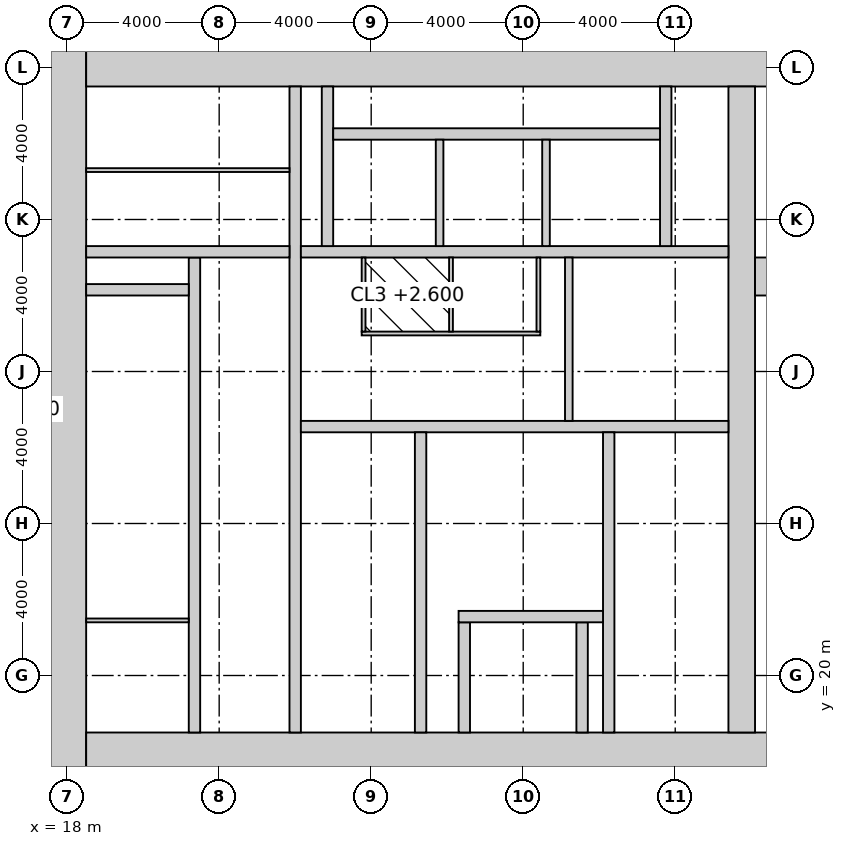
"""IFC4 building model, lengths in metres.
Left out: names, types, materials, properties, quantities, classifications, styles, units other than length and angle.
Written with IfcOpenShell. Run it as: python <this file> out.ifc"""

import sys

from ifc_helpers import new_model, si_unit, direction, frame, frame_2d, origin, place, context, subcontext, project, spatial, rectangle, extrude, element, fill, save


model = new_model("IFC4")
c1 = context("Model", 3, precision=1e-05, world=origin(), true_north=direction((0.0, 1.0)))
c2 = subcontext(c1, "Body", "Model", "MODEL_VIEW")
j1 = project(units=[si_unit("LENGTHUNIT", "METRE"), si_unit("PLANEANGLEUNIT", "RADIAN")], contexts=[c1])
p1 = place(None, origin())
s1 = spatial("IfcSite", under=j1, at=p1, CompositionType="ELEMENT")
p2 = place(p1, origin())
s2 = spatial("IfcBuilding", under=s1, at=p2, CompositionType="ELEMENT")
p3 = place(p2, frame((0.0, 0.0, 51.0)))
s3 = spatial("IfcBuildingStorey", under=s2, at=p3, CompositionType="ELEMENT", Elevation=51.0)
p4 = place(p3, frame((18.0, 17.1, -0.15), z_axis=(0.0, 0.0, 1.0), x_axis=(0.0, 1.0, 0.0)))
e1 = element("IfcWall", 1, at=p4, inside=s3, PredefinedType="SHEAR", context=c2, shape_type="SweptSolid", body=[
    extrude(rectangle(XDim=19.8, YDim=1.0, at=frame_2d((9.9, 0.0))), origin(), (0.0, 0.0, 1.0), 4.0),
])
p5 = place(p3, frame((18.5, 17.8, -0.15), z_axis=(0.0, 0.0, 1.0), x_axis=(1.0, 0.0, 0.0)))
e2 = element("IfcWall", 2, at=p5, inside=s3, PredefinedType="SHEAR", context=c2, shape_type="SweptSolid", body=[
    extrude(rectangle(XDim=23.4, YDim=1.4, at=frame_2d((11.7, 0.0))), origin(), (0.0, 0.0, 1.0), 4.0),
])
p6 = place(p5, frame((3.45, 0.0, 0.15)))
e3 = element("IfcOpeningElement", 3, at=p6, cuts=e2, PredefinedType="OPENING", context=c2, shape_type="SweptSolid", body=[
    extrude(rectangle(XDim=1.5, YDim=2.4, at=frame_2d((0.75, 1.2))), frame((0.0, 0.71, 0.0), z_axis=(0.0, -1.0, 0.0), x_axis=(1.0, 0.0, 0.0)), (0.0, 0.0, 1.0), 1.42),
])
p7 = place(p5, frame((17.9, 0.0, 0.15)))
e4 = element("IfcOpeningElement", 4, at=p7, cuts=e2, PredefinedType="OPENING", context=c2, shape_type="SweptSolid", body=[
    extrude(rectangle(XDim=1.5, YDim=2.4, at=frame_2d((0.75, 1.2))), frame((0.0, 0.71, 0.0), z_axis=(0.0, -1.0, 0.0), x_axis=(1.0, 0.0, 0.0)), (0.0, 0.0, 1.0), 1.42),
])
p8 = place(p5, frame((0.9, 0.0, 0.15)))
e5 = element("IfcOpeningElement", 5, at=p8, cuts=e2, PredefinedType="OPENING", context=c2, shape_type="SweptSolid", body=[
    extrude(rectangle(XDim=1.0, YDim=2.2, at=frame_2d((0.5, 1.1))), frame((0.0, 0.71, 0.0), z_axis=(0.0, -1.0, 0.0), x_axis=(1.0, 0.0, 0.0)), (0.0, 0.0, 1.0), 1.42),
])
p9 = place(p3, frame((18.5, 36.2, -0.15), z_axis=(0.0, 0.0, 1.0), x_axis=(1.0, 0.0, 0.0)))
e6 = element("IfcWall", 6, at=p9, inside=s3, PredefinedType="SHEAR", context=c2, shape_type="SweptSolid", body=[
    extrude(rectangle(XDim=23.4, YDim=1.4, at=frame_2d((11.7, 0.0))), origin(), (0.0, 0.0, 1.0), 4.0),
])
p10 = place(p3, frame((35.75, 18.5, -0.15), z_axis=(0.0, 0.0, 1.0), x_axis=(0.0, 1.0, 0.0)))
e7 = element("IfcWall", 7, at=p10, inside=s3, PredefinedType="SHEAR", context=c2, shape_type="SweptSolid", body=[
    extrude(rectangle(XDim=17.0, YDim=0.7, at=frame_2d((8.5, 0.0))), origin(), (0.0, 0.0, 1.0), 4.0),
])
p11 = place(p10, frame((9.85, 0.0, 0.15)))
e8 = element("IfcOpeningElement", 8, at=p11, cuts=e7, PredefinedType="OPENING", context=c2, shape_type="SweptSolid", body=[
    extrude(rectangle(XDim=1.0, YDim=2.2, at=frame_2d((0.5, 1.1))), frame((0.0, 0.36, 0.0), z_axis=(0.0, -1.0, 0.0), x_axis=(1.0, 0.0, 0.0)), (0.0, 0.0, 1.0), 0.72),
])
p12 = place(p3, frame((24.0, 18.5, -0.15), z_axis=(0.0, 0.0, 1.0), x_axis=(0.0, 1.0, 0.0)))
e9 = element("IfcWall", 9, at=p12, inside=s3, PredefinedType="SHEAR", context=c2, shape_type="SweptSolid", body=[
    extrude(rectangle(XDim=17.0, YDim=0.3, at=frame_2d((8.5, 0.0))), origin(), (0.0, 0.0, 1.0), 4.0),
])
p13 = place(p12, frame((9.6, 0.0, 0.15)))
e10 = element("IfcOpeningElement", 10, at=p13, cuts=e9, PredefinedType="OPENING", context=c2, shape_type="SweptSolid", body=[
    extrude(rectangle(XDim=1.5, YDim=2.4, at=frame_2d((0.75, 1.2))), frame((0.0, 0.16, 0.0), z_axis=(0.0, -1.0, 0.0), x_axis=(1.0, 0.0, 0.0)), (0.0, 0.0, 1.0), 0.32),
])
p14 = place(p3, frame((24.15, 26.55, -0.15), z_axis=(0.0, 0.0, 1.0), x_axis=(1.0, 0.0, 0.0)))
e11 = element("IfcWall", 11, at=p14, inside=s3, PredefinedType="SHEAR", context=c2, shape_type="SweptSolid", body=[
    extrude(rectangle(XDim=11.25, YDim=0.3, at=frame_2d((5.625, 0.0))), origin(), (0.0, 0.0, 1.0), 4.0),
])
p15 = place(p14, frame((9.25, 0.0, 0.15)))
e12 = element("IfcOpeningElement", 12, at=p15, cuts=e11, PredefinedType="OPENING", context=c2, shape_type="SweptSolid", body=[
    extrude(rectangle(XDim=1.0, YDim=2.2, at=frame_2d((0.5, 1.1))), frame((0.0, 0.16, 0.0), z_axis=(0.0, -1.0, 0.0), x_axis=(1.0, 0.0, 0.0)), (0.0, 0.0, 1.0), 0.32),
])
p16 = place(p14, frame((4.9, 0.0, 0.15)))
e13 = element("IfcOpeningElement", 13, at=p16, cuts=e11, PredefinedType="OPENING", context=c2, shape_type="SweptSolid", body=[
    extrude(rectangle(XDim=1.5, YDim=2.4, at=frame_2d((0.75, 1.2))), frame((0.0, 0.16, 0.0), z_axis=(0.0, -1.0, 0.0), x_axis=(1.0, 0.0, 0.0)), (0.0, 0.0, 1.0), 0.32),
])
p17 = place(p3, frame((27.3, 18.5, -0.15), z_axis=(0.0, 0.0, 1.0), x_axis=(0.0, 1.0, 0.0)))
e14 = element("IfcWall", 14, at=p17, inside=s3, PredefinedType="SHEAR", context=c2, shape_type="SweptSolid", body=[
    extrude(rectangle(XDim=7.9, YDim=0.3, at=frame_2d((3.95, 0.0))), origin(), (0.0, 0.0, 1.0), 4.0),
])
p18 = place(p17, frame((6.4, 0.0, 0.15)))
e15 = element("IfcOpeningElement", 15, at=p18, cuts=e14, PredefinedType="OPENING", context=c2, shape_type="SweptSolid", body=[
    extrude(rectangle(XDim=1.0, YDim=2.2, at=frame_2d((0.5, 1.1))), frame((0.0, 0.16, 0.0), z_axis=(0.0, -1.0, 0.0), x_axis=(1.0, 0.0, 0.0)), (0.0, 0.0, 1.0), 0.32),
])
p19 = place(p3, frame((32.25, 18.5, -0.15), z_axis=(0.0, 0.0, 1.0), x_axis=(0.0, 1.0, 0.0)))
e16 = element("IfcWall", 16, at=p19, inside=s3, PredefinedType="SHEAR", context=c2, shape_type="SweptSolid", body=[
    extrude(rectangle(XDim=7.9, YDim=0.3, at=frame_2d((3.95, 0.0))), origin(), (0.0, 0.0, 1.0), 4.0),
])
for number, where, z_axis, x_axis in (
    (17, (28.45, 18.5, -0.15), (0.0, 0.0, 1.0), (0.0, 1.0, 0.0)),
    (18, (31.55, 18.5, -0.15), (0.0, 0.0, 1.0), (0.0, 1.0, 0.0)),
):
    element("IfcWall", number, at=place(p3, frame(where, z_axis=z_axis, x_axis=x_axis)), inside=s3, PredefinedType="SHEAR", context=c2, shape_type="SweptSolid", body=[
        extrude(rectangle(XDim=2.9, YDim=0.3, at=frame_2d((1.45, 0.0))), origin(), (0.0, 0.0, 1.0), 4.0),
    ])
p20 = place(p3, frame((28.3, 21.55, -0.15), z_axis=(0.0, 0.0, 1.0), x_axis=(1.0, 0.0, 0.0)))
e19 = element("IfcWall", 19, at=p20, inside=s3, PredefinedType="SHEAR", context=c2, shape_type="SweptSolid", body=[
    extrude(rectangle(XDim=3.8, YDim=0.3, at=frame_2d((1.9, 0.0))), origin(), (0.0, 0.0, 1.0), 4.0),
])
p21 = place(p20, frame((1.05, 0.0, 0.15)))
e20 = element("IfcOpeningElement", 20, at=p21, cuts=e19, PredefinedType="OPENING", context=c2, shape_type="SweptSolid", body=[
    extrude(rectangle(XDim=1.3, YDim=2.4, at=frame_2d((0.65, 1.2))), frame((0.0, 0.16, 0.0), z_axis=(0.0, -1.0, 0.0), x_axis=(1.0, 0.0, 0.0)), (0.0, 0.0, 1.0), 0.32),
])
p22 = place(p3, frame((24.15, 31.15, -0.15), z_axis=(0.0, 0.0, 1.0), x_axis=(1.0, 0.0, 0.0)))
e21 = element("IfcWall", 21, at=p22, inside=s3, PredefinedType="SHEAR", context=c2, shape_type="SweptSolid", body=[
    extrude(rectangle(XDim=11.25, YDim=0.3, at=frame_2d((5.625, 0.0))), origin(), (0.0, 0.0, 1.0), 4.0),
])
p23 = place(p22, frame((7.25, 0.0, 0.15)))
e22 = element("IfcOpeningElement", 22, at=p23, cuts=e21, PredefinedType="OPENING", context=c2, shape_type="SweptSolid", body=[
    extrude(rectangle(XDim=1.4, YDim=2.4, at=frame_2d((0.7, 1.2))), frame((0.0, 0.16, 0.0), z_axis=(0.0, -1.0, 0.0), x_axis=(1.0, 0.0, 0.0)), (0.0, 0.0, 1.0), 0.32),
])
p24 = place(p3, frame((21.35, 18.5, -0.15), z_axis=(0.0, 0.0, 1.0), x_axis=(0.0, 1.0, 0.0)))
e23 = element("IfcWall", 23, at=p24, inside=s3, PredefinedType="SHEAR", context=c2, shape_type="SweptSolid", body=[
    extrude(rectangle(XDim=12.5, YDim=0.3, at=frame_2d((6.25, 0.0))), origin(), (0.0, 0.0, 1.0), 4.0),
])
p25 = place(p24, frame((6.725, 0.0, 0.15)))
e24 = element("IfcOpeningElement", 24, at=p25, cuts=e23, PredefinedType="OPENING", context=c2, shape_type="SweptSolid", body=[
    extrude(rectangle(XDim=1.0, YDim=2.2, at=frame_2d((0.5, 1.1))), frame((0.0, 0.16, 0.0), z_axis=(0.0, -1.0, 0.0), x_axis=(1.0, 0.0, 0.0)), (0.0, 0.0, 1.0), 0.32),
])
p26 = place(p3, frame((18.5, 31.15, -0.15), z_axis=(0.0, 0.0, 1.0), x_axis=(1.0, 0.0, 0.0)))
e25 = element("IfcWall", 25, at=p26, inside=s3, PredefinedType="SHEAR", context=c2, shape_type="SweptSolid", body=[
    extrude(rectangle(XDim=5.35, YDim=0.3, at=frame_2d((2.675, 0.0))), origin(), (0.0, 0.0, 1.0), 4.0),
])
p27 = place(p26, frame((3.4, 0.0, 0.15)))
e26 = element("IfcOpeningElement", 26, at=p27, cuts=e25, PredefinedType="OPENING", context=c2, shape_type="SweptSolid", body=[
    extrude(rectangle(XDim=1.0, YDim=2.2, at=frame_2d((0.5, 1.1))), frame((0.0, 0.16, 0.0), z_axis=(0.0, -1.0, 0.0), x_axis=(1.0, 0.0, 0.0)), (0.0, 0.0, 1.0), 0.32),
])
p28 = place(p3, frame((18.5, 30.15, -0.15), z_axis=(0.0, 0.0, 1.0), x_axis=(1.0, 0.0, 0.0)))
e27 = element("IfcWall", 27, at=p28, inside=s3, PredefinedType="SHEAR", context=c2, shape_type="SweptSolid", body=[
    extrude(rectangle(XDim=2.7, YDim=0.3, at=frame_2d((1.35, 0.0))), origin(), (0.0, 0.0, 1.0), 4.0),
])
for number, where, z_axis, x_axis in (
    (28, (24.85, 31.3, -0.15), (0.0, 0.0, 1.0), (0.0, 1.0, 0.0)),
    (29, (33.75, 31.3, -0.15), (0.0, 0.0, 1.0), (0.0, 1.0, 0.0)),
):
    element("IfcWall", number, at=place(p3, frame(where, z_axis=z_axis, x_axis=x_axis)), inside=s3, PredefinedType="SHEAR", context=c2, shape_type="SweptSolid", body=[
        extrude(rectangle(XDim=4.2, YDim=0.3, at=frame_2d((2.1, 0.0))), origin(), (0.0, 0.0, 1.0), 4.0),
    ])
p29 = place(p3, frame((25.0, 34.25, -0.15), z_axis=(0.0, 0.0, 1.0), x_axis=(1.0, 0.0, 0.0)))
e30 = element("IfcWall", 30, at=p29, inside=s3, PredefinedType="SHEAR", context=c2, shape_type="SweptSolid", body=[
    extrude(rectangle(XDim=8.6, YDim=0.3, at=frame_2d((4.3, 0.0))), origin(), (0.0, 0.0, 1.0), 4.0),
])
for number, where, z_axis, x_axis in (
    (31, (27.8, 31.3, -0.15), (0.0, 0.0, 1.0), (0.0, 1.0, 0.0)),
    (32, (30.6, 31.3, -0.15), (0.0, 0.0, 1.0), (0.0, 1.0, 0.0)),
):
    element("IfcWall", number, at=place(p3, frame(where, z_axis=z_axis, x_axis=x_axis)), inside=s3, PredefinedType="SOLIDWALL", context=c2, shape_type="SweptSolid", body=[
        extrude(rectangle(XDim=2.8, YDim=0.2, at=frame_2d((1.4, 0.0))), origin(), (0.0, 0.0, 1.0), 4.0),
    ])
p30 = place(p3, frame((36.1, 30.5, -0.15), z_axis=(0.0, 0.0, 1.0), x_axis=(1.0, 0.0, 0.0)))
e33 = element("IfcWall", 33, at=p30, inside=s3, PredefinedType="SHEAR", context=c2, shape_type="SweptSolid", body=[
    extrude(rectangle(XDim=5.8, YDim=1.0, at=frame_2d((2.9, 0.0))), origin(), (0.0, 0.0, 1.0), 4.0),
])
p31 = place(p30, frame((0.6, 0.0, 0.15)))
e34 = element("IfcOpeningElement", 34, at=p31, cuts=e33, PredefinedType="OPENING", context=c2, shape_type="SweptSolid", body=[
    extrude(rectangle(XDim=1.0, YDim=2.2, at=frame_2d((0.5, 1.1))), frame((0.0, 0.51, 0.0), z_axis=(0.0, -1.0, 0.0), x_axis=(1.0, 0.0, 0.0)), (0.0, 0.0, 1.0), 1.02),
])
p32 = place(p3, frame((31.2, 26.7, 0.0), z_axis=(0.0, 0.0, 1.0), x_axis=(0.0, 1.0, 0.0)))
e35 = element("IfcWall", 35, at=p32, inside=s3, PredefinedType="SOLIDWALL", context=c2, shape_type="SweptSolid", body=[
    extrude(rectangle(XDim=4.3, YDim=0.2, at=frame_2d((2.15, 0.0))), origin(), (0.0, 0.0, 1.0), 3.85),
])
p33 = place(p3, frame((18.5, 33.3, 0.0), z_axis=(0.0, 0.0, 1.0), x_axis=(1.0, 0.0, 0.0)))
e36 = element("IfcWall", 36, at=p33, inside=s3, PredefinedType="PARTITIONING", context=c2, shape_type="SweptSolid", body=[
    extrude(rectangle(XDim=5.35, YDim=0.1, at=frame_2d((2.675, 0.0))), origin(), (0.0, 0.0, 1.0), 3.85),
])
p34 = place(p33, frame((1.2, 0.0, 0.0)))
e37 = element("IfcOpeningElement", 37, at=p34, cuts=e36, PredefinedType="OPENING", context=c2, shape_type="SweptSolid", body=[
    extrude(rectangle(XDim=1.0, YDim=2.2, at=frame_2d((0.5, 1.1))), frame((0.0, 0.06, 0.0), z_axis=(0.0, -1.0, 0.0), x_axis=(1.0, 0.0, 0.0)), (0.0, 0.0, 1.0), 0.12),
])
p35 = place(p3, frame((25.75, 29.0, 0.0), z_axis=(0.0, 0.0, 1.0), x_axis=(1.0, 0.0, 0.0)))
e38 = element("IfcWall", 38, at=p35, inside=s3, PredefinedType="PARTITIONING", context=c2, shape_type="SweptSolid", body=[
    extrude(rectangle(XDim=4.7, YDim=0.1, at=frame_2d((2.35, 0.0))), origin(), (0.0, 0.0, 1.0), 3.85),
])
p36 = place(p35, frame((0.7, 0.0, 0.0)))
e39 = element("IfcOpeningElement", 39, at=p36, cuts=e38, PredefinedType="OPENING", context=c2, shape_type="SweptSolid", body=[
    extrude(rectangle(XDim=1.0, YDim=2.2, at=frame_2d((0.5, 1.1))), frame((0.0, 0.06, 0.0), z_axis=(0.0, -1.0, 0.0), x_axis=(1.0, 0.0, 0.0)), (0.0, 0.0, 1.0), 0.12),
])
p37 = place(p35, frame((3.0, 0.0, 0.0)))
e40 = element("IfcOpeningElement", 40, at=p37, cuts=e38, PredefinedType="OPENING", context=c2, shape_type="SweptSolid", body=[
    extrude(rectangle(XDim=1.0, YDim=2.2, at=frame_2d((0.5, 1.1))), frame((0.0, 0.06, 0.0), z_axis=(0.0, -1.0, 0.0), x_axis=(1.0, 0.0, 0.0)), (0.0, 0.0, 1.0), 0.12),
])
for number, where, z_axis, x_axis in (
    (41, (25.8, 29.05, 0.0), (0.0, 0.0, 1.0), (0.0, 1.0, 0.0)),
    (42, (30.4, 29.05, 0.0), (0.0, 0.0, 1.0), (0.0, 1.0, 0.0)),
    (43, (28.1, 29.05, 0.0), (0.0, 0.0, 1.0), (0.0, 1.0, 0.0)),
):
    element("IfcWall", number, at=place(p3, frame(where, z_axis=z_axis, x_axis=x_axis)), inside=s3, PredefinedType="PARTITIONING", context=c2, shape_type="SweptSolid", body=[
        extrude(rectangle(XDim=1.95, YDim=0.1, at=frame_2d((0.975, 0.0))), origin(), (0.0, 0.0, 1.0), 3.85),
    ])
p38 = place(p3, frame((18.5, 21.45, 0.0), z_axis=(0.0, 0.0, 1.0), x_axis=(1.0, 0.0, 0.0)))
e44 = element("IfcWall", 44, at=p38, inside=s3, PredefinedType="PARTITIONING", context=c2, shape_type="SweptSolid", body=[
    extrude(rectangle(XDim=2.7, YDim=0.1, at=frame_2d((1.35, 0.0))), origin(), (0.0, 0.0, 1.0), 3.85),
])
p39 = place(p18, origin())
e45 = element("IfcDoor", 45, at=p39, inside=s3, OperationType="SINGLE_SWING_RIGHT", PredefinedType="DOOR", context=c2, shape_type="SweptSolid", body=[
    extrude(rectangle(XDim=1.0, YDim=2.2, at=frame_2d((0.5, 1.1))), frame((0.0, 0.025, 0.0), z_axis=(0.0, -1.0, 0.0), x_axis=(1.0, 0.0, 0.0)), (0.0, 0.0, 1.0), 0.05),
])
fill(e15, e45)
p40 = place(p15, frame((1.0, 0.0, 0.0), z_axis=(0.0, 0.0, 1.0), x_axis=(-1.0, 0.0, 0.0)))
e46 = element("IfcDoor", 46, at=p40, inside=s3, OperationType="SINGLE_SWING_RIGHT", PredefinedType="DOOR", context=c2, shape_type="SweptSolid", body=[
    extrude(rectangle(XDim=1.0, YDim=2.2, at=frame_2d((0.5, 1.1))), frame((0.0, 0.025, 0.0), z_axis=(0.0, -1.0, 0.0), x_axis=(1.0, 0.0, 0.0)), (0.0, 0.0, 1.0), 0.05),
])
fill(e12, e46)
p41 = place(p11, origin())
e47 = element("IfcDoor", 47, at=p41, inside=s3, OperationType="SINGLE_SWING_RIGHT", PredefinedType="DOOR", context=c2, shape_type="SweptSolid", body=[
    extrude(rectangle(XDim=1.0, YDim=2.2, at=frame_2d((0.5, 1.1))), frame((0.0, 0.025, 0.0), z_axis=(0.0, -1.0, 0.0), x_axis=(1.0, 0.0, 0.0)), (0.0, 0.0, 1.0), 0.05),
])
fill(e8, e47)
p42 = place(p16, origin())
e48 = element("IfcDoor", 48, at=p42, inside=s3, OperationType="DOUBLE_DOOR_DOUBLE_SWING", PredefinedType="DOOR", context=c2, shape_type="SweptSolid", body=[
    extrude(rectangle(XDim=1.5, YDim=2.4, at=frame_2d((0.75, 1.2))), frame((0.0, 0.025, 0.0), z_axis=(0.0, -1.0, 0.0), x_axis=(1.0, 0.0, 0.0)), (0.0, 0.0, 1.0), 0.05),
])
fill(e13, e48)
p43 = place(p13, origin())
e49 = element("IfcDoor", 49, at=p43, inside=s3, OperationType="DOUBLE_DOOR_DOUBLE_SWING", PredefinedType="DOOR", context=c2, shape_type="SweptSolid", body=[
    extrude(rectangle(XDim=1.5, YDim=2.4, at=frame_2d((0.75, 1.2))), frame((0.0, 0.025, 0.0), z_axis=(0.0, -1.0, 0.0), x_axis=(1.0, 0.0, 0.0)), (0.0, 0.0, 1.0), 0.05),
])
fill(e10, e49)
p44 = place(p27, origin())
e50 = element("IfcDoor", 50, at=p44, inside=s3, OperationType="SINGLE_SWING_LEFT", PredefinedType="DOOR", context=c2, shape_type="SweptSolid", body=[
    extrude(rectangle(XDim=1.0, YDim=2.2, at=frame_2d((0.5, 1.1))), frame((0.0, 0.025, 0.0), z_axis=(0.0, -1.0, 0.0), x_axis=(1.0, 0.0, 0.0)), (0.0, 0.0, 1.0), 0.05),
])
fill(e26, e50)
p45 = place(p34, origin())
e51 = element("IfcDoor", 51, at=p45, inside=s3, OperationType="SINGLE_SWING_LEFT", PredefinedType="DOOR", context=c2, shape_type="SweptSolid", body=[
    extrude(rectangle(XDim=1.0, YDim=2.2, at=frame_2d((0.5, 1.1))), frame((0.0, 0.025, 0.0), z_axis=(0.0, -1.0, 0.0), x_axis=(1.0, 0.0, 0.0)), (0.0, 0.0, 1.0), 0.05),
])
fill(e37, e51)
p46 = place(p36, origin())
e52 = element("IfcDoor", 52, at=p46, inside=s3, OperationType="SINGLE_SWING_LEFT", PredefinedType="DOOR", context=c2, shape_type="SweptSolid", body=[
    extrude(rectangle(XDim=1.0, YDim=2.2, at=frame_2d((0.5, 1.1))), frame((0.0, 0.025, 0.0), z_axis=(0.0, -1.0, 0.0), x_axis=(1.0, 0.0, 0.0)), (0.0, 0.0, 1.0), 0.05),
])
fill(e39, e52)
p47 = place(p37, origin())
e53 = element("IfcDoor", 53, at=p47, inside=s3, OperationType="SINGLE_SWING_LEFT", PredefinedType="DOOR", context=c2, shape_type="SweptSolid", body=[
    extrude(rectangle(XDim=1.0, YDim=2.2, at=frame_2d((0.5, 1.1))), frame((0.0, 0.025, 0.0), z_axis=(0.0, -1.0, 0.0), x_axis=(1.0, 0.0, 0.0)), (0.0, 0.0, 1.0), 0.05),
])
fill(e40, e53)
p48 = place(p25, origin())
e54 = element("IfcDoor", 54, at=p48, inside=s3, OperationType="SINGLE_SWING_LEFT", PredefinedType="DOOR", context=c2, shape_type="SweptSolid", body=[
    extrude(rectangle(XDim=1.0, YDim=2.2, at=frame_2d((0.5, 1.1))), frame((0.0, 0.025, 0.0), z_axis=(0.0, -1.0, 0.0), x_axis=(1.0, 0.0, 0.0)), (0.0, 0.0, 1.0), 0.05),
])
fill(e24, e54)
p49 = place(p6, origin())
e55 = element("IfcDoor", 55, at=p49, inside=s3, OperationType="DOUBLE_DOOR_DOUBLE_SWING", PredefinedType="DOOR", context=c2, shape_type="SweptSolid", body=[
    extrude(rectangle(XDim=1.5, YDim=2.4, at=frame_2d((0.75, 1.2))), frame((0.0, 0.025, 0.0), z_axis=(0.0, -1.0, 0.0), x_axis=(1.0, 0.0, 0.0)), (0.0, 0.0, 1.0), 0.05),
])
fill(e3, e55)
p50 = place(p8, origin())
e56 = element("IfcDoor", 56, at=p50, inside=s3, OperationType="SINGLE_SWING_LEFT", PredefinedType="DOOR", context=c2, shape_type="SweptSolid", body=[
    extrude(rectangle(XDim=1.0, YDim=2.2, at=frame_2d((0.5, 1.1))), frame((0.0, 0.025, 0.0), z_axis=(0.0, -1.0, 0.0), x_axis=(1.0, 0.0, 0.0)), (0.0, 0.0, 1.0), 0.05),
])
fill(e5, e56)
p51 = place(p21, origin())
e57 = element("IfcDoor", 57, at=p51, inside=s3, OperationType="DOUBLE_DOOR_SLIDING", PredefinedType="DOOR", context=c2, shape_type="SweptSolid", body=[
    extrude(rectangle(XDim=1.3, YDim=2.4, at=frame_2d((0.65, 1.2))), frame((0.0, 0.025, 0.0), z_axis=(0.0, -1.0, 0.0), x_axis=(1.0, 0.0, 0.0)), (0.0, 0.0, 1.0), 0.05),
])
fill(e20, e57)
p52 = place(p23, origin())
e58 = element("IfcDoor", 58, at=p52, inside=s3, OperationType="DOUBLE_DOOR_SLIDING", PredefinedType="DOOR", context=c2, shape_type="SweptSolid", body=[
    extrude(rectangle(XDim=1.4, YDim=2.4, at=frame_2d((0.7, 1.2))), frame((0.0, 0.025, 0.0), z_axis=(0.0, -1.0, 0.0), x_axis=(1.0, 0.0, 0.0)), (0.0, 0.0, 1.0), 0.05),
])
fill(e22, e58)
save(model, sys.argv[1])
